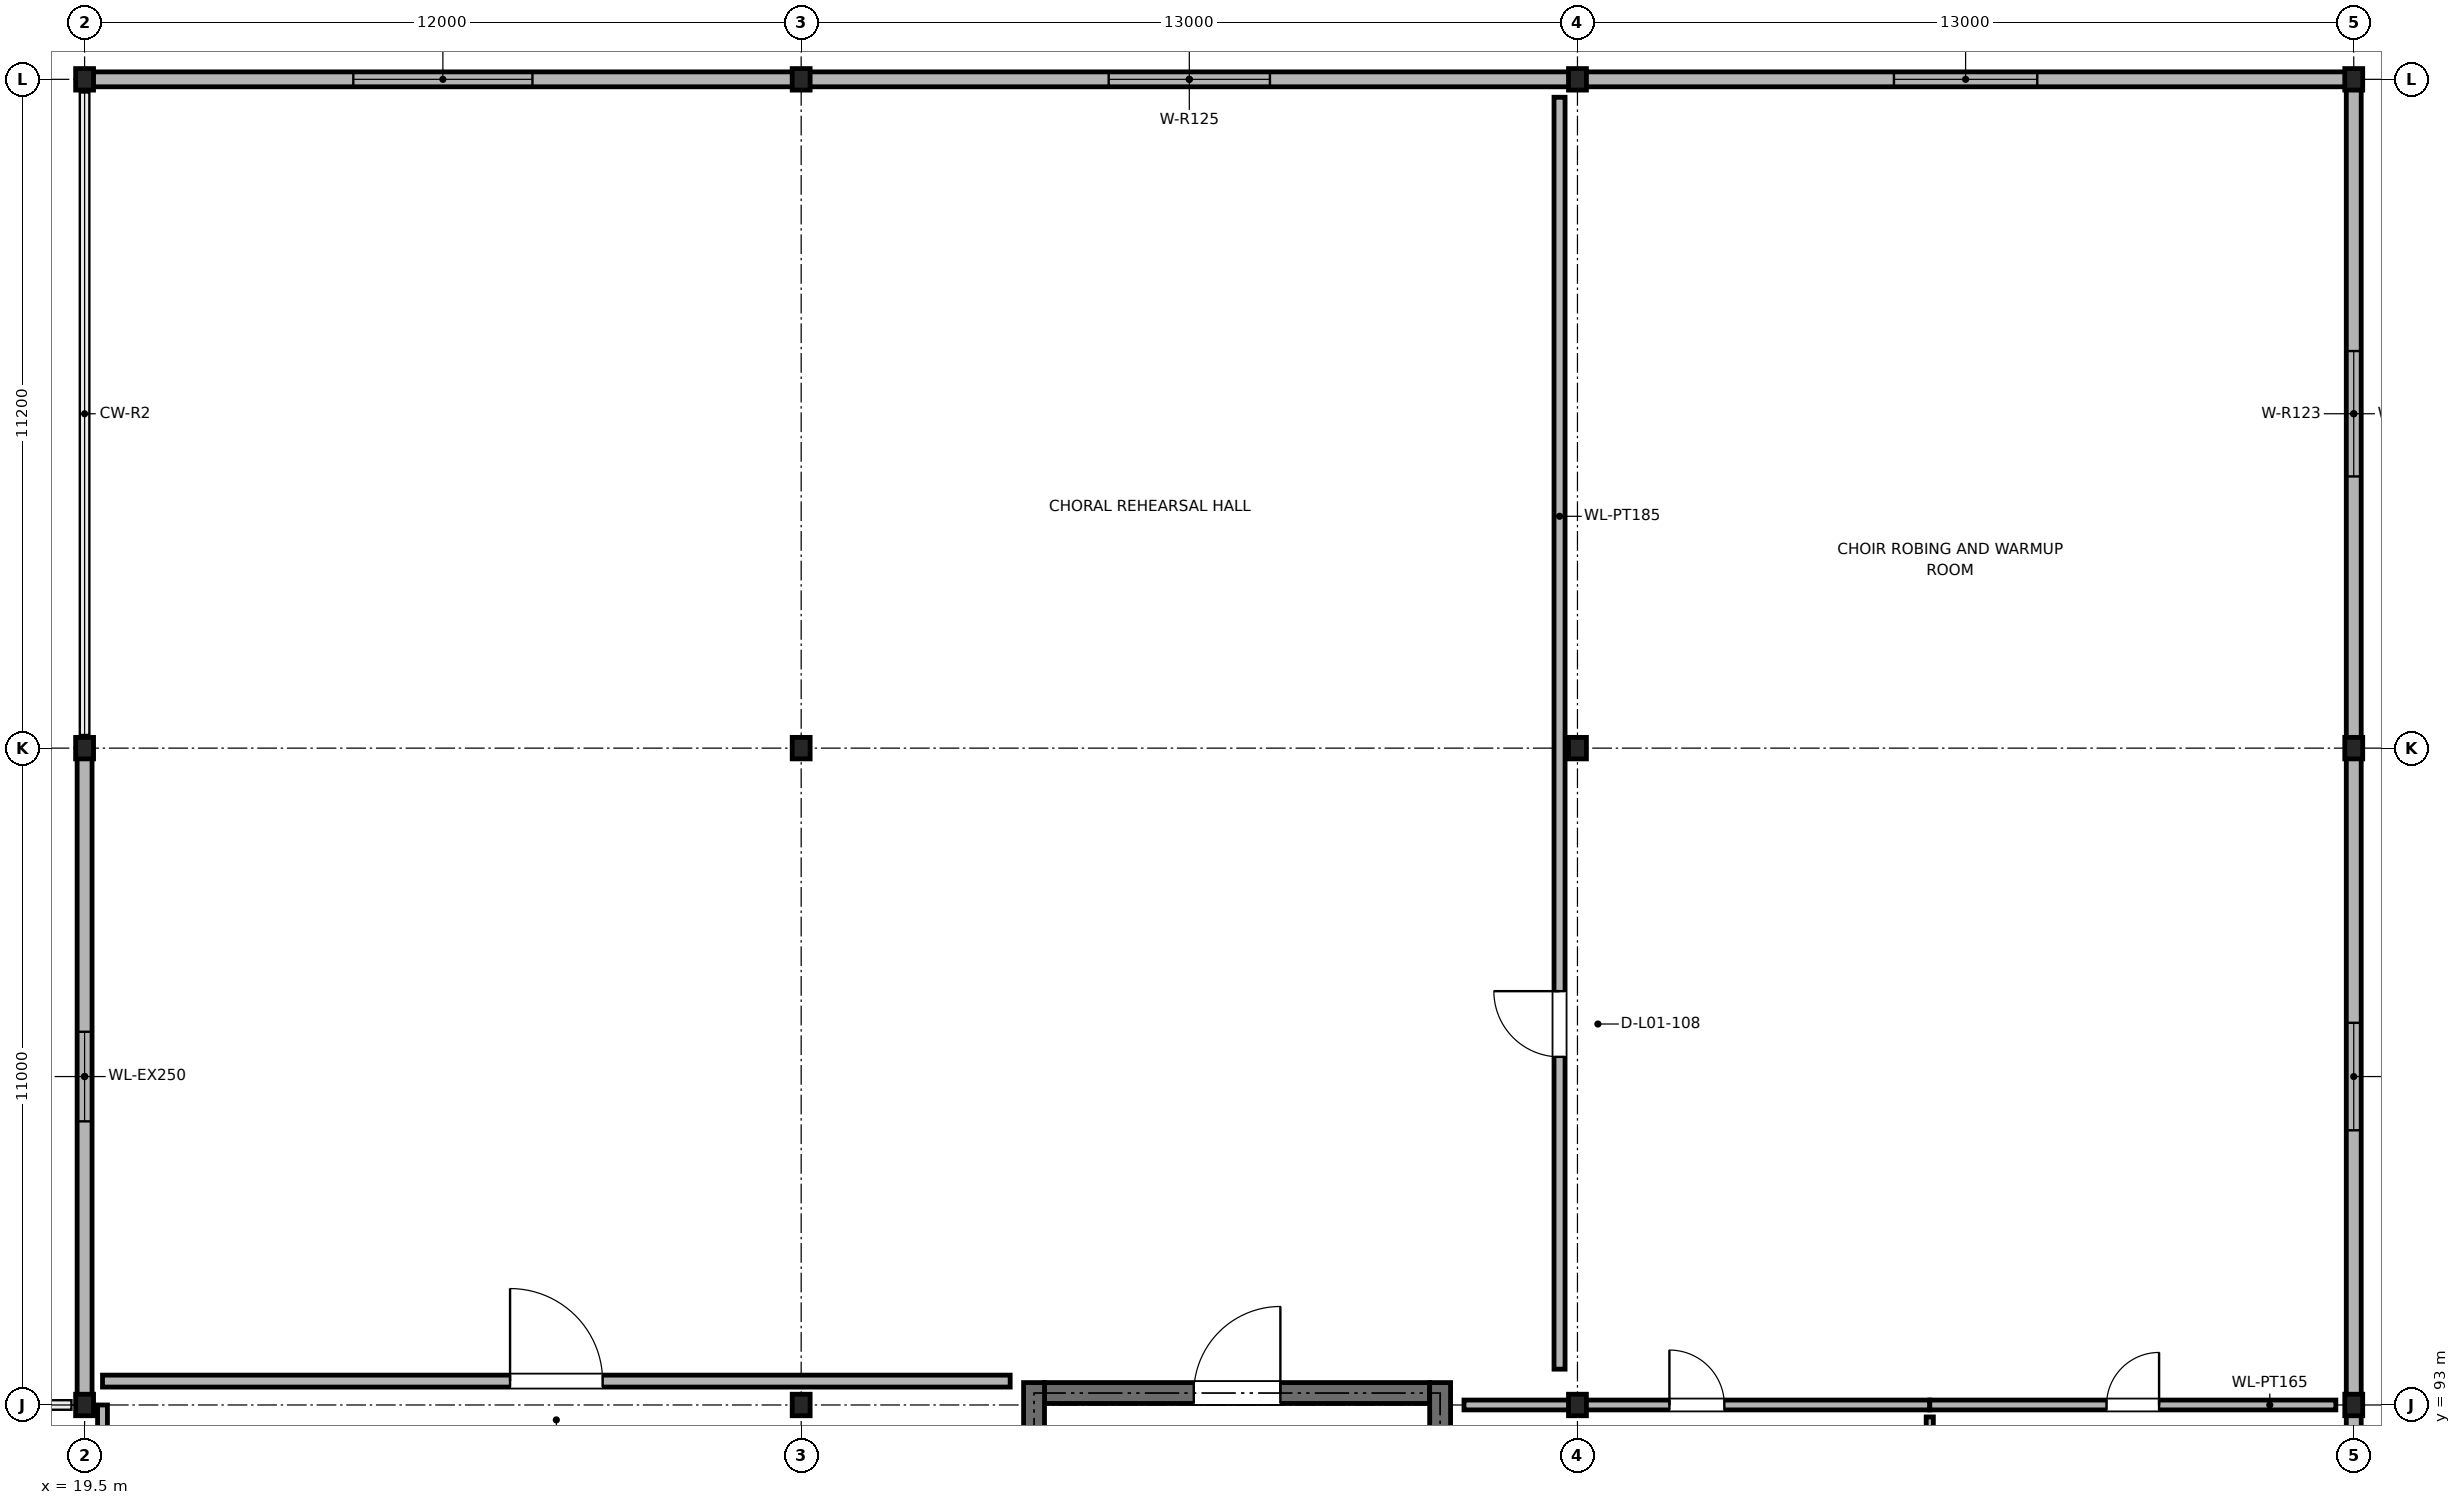
"""IFC4 building model, lengths in metres.
Left out: names, types, materials, properties, quantities, classifications, styles, units other than length and angle.
Written with IfcOpenShell. Run it as: python <this file> out.ifc"""

import sys

from ifc_helpers import new_model, si_unit, direction, frame, frame_2d, origin, origin_2d, place, context, subcontext, project, spatial, rectangle, i_section, extrude, element, fill, save


model = new_model("IFC4")
c1 = context("Model", 3, precision=1e-05, world=origin(), true_north=direction((0.0, 1.0)))
c2 = subcontext(c1, "Body", "Model", "MODEL_VIEW")
j1 = project(units=[si_unit("LENGTHUNIT", "METRE"), si_unit("PLANEANGLEUNIT", "RADIAN")], contexts=[c1])
p1 = place(None, origin())
s1 = spatial("IfcSite", under=j1, at=p1, CompositionType="ELEMENT")
p2 = place(p1, origin())
s2 = spatial("IfcBuilding", under=s1, at=p2, CompositionType="ELEMENT")
p3 = place(p2, frame((0.0, 0.0, 4.8)))
s3 = spatial("IfcBuildingStorey", under=s2, at=p3, CompositionType="ELEMENT", Elevation=4.8)
for number, where, z_axis, x_axis in (
    (1, (19.5, 93.0, 0.0), (0.0, 0.0, 1.0), (1.0, 0.0, 0.0)),
    (2, (19.5, 104.0, 0.0), (0.0, 0.0, 1.0), (1.0, 0.0, 0.0)),
    (3, (19.5, 115.2, 0.0), (0.0, 0.0, 1.0), (1.0, 0.0, 0.0)),
    (4, (31.5, 93.0, 0.0), (0.0, 0.0, 1.0), (1.0, 0.0, 0.0)),
    (5, (31.5, 104.0, 0.0), (0.0, 0.0, 1.0), (1.0, 0.0, 0.0)),
    (6, (31.5, 115.2, 0.0), (0.0, 0.0, 1.0), (1.0, 0.0, 0.0)),
    (7, (44.5, 93.0, 0.0), (0.0, 0.0, 1.0), (1.0, 0.0, 0.0)),
    (8, (44.5, 104.0, 0.0), (0.0, 0.0, 1.0), (1.0, 0.0, 0.0)),
    (9, (44.5, 115.2, 0.0), (0.0, 0.0, 1.0), (1.0, 0.0, 0.0)),
    (10, (57.5, 93.0, 0.0), (0.0, 0.0, 1.0), (1.0, 0.0, 0.0)),
    (11, (57.5, 104.0, 0.0), (0.0, 0.0, 1.0), (1.0, 0.0, 0.0)),
    (12, (57.5, 115.2, 0.0), (0.0, 0.0, 1.0), (1.0, 0.0, 0.0)),
):
    element("IfcColumn", number, at=place(p3, frame(where, z_axis=z_axis, x_axis=x_axis)), inside=s3, PredefinedType="COLUMN", context=c2, shape_type="SweptSolid", body=[
        extrude(i_section(OverallWidth=0.3, OverallDepth=0.36, WebThickness=0.012, FlangeThickness=0.022, FilletRadius=0.027, at=origin_2d()), origin(), (0.0, 0.0, 1.0), 4.8),
    ])
p4 = place(p3, frame((57.5, 92.98, 0.0), z_axis=(0.0, 0.0, 1.0), x_axis=(0.0, -1.0, 0.0)))
e13 = element("IfcWall", 13, at=p4, inside=s3, PredefinedType="SOLIDWALL", context=c2, shape_type="SweptSolid", body=[
    extrude(rectangle(XDim=10.96, YDim=0.25, at=frame_2d((5.48, 0.0))), origin(), (0.0, 0.0, 1.0), 4.078),
])
p5 = place(p3, frame((57.5, 103.98, 0.0), z_axis=(0.0, 0.0, 1.0), x_axis=(0.0, -1.0, 0.0)))
e14 = element("IfcWall", 14, at=p5, inside=s3, PredefinedType="SOLIDWALL", context=c2, shape_type="SweptSolid", body=[
    extrude(rectangle(XDim=10.96, YDim=0.25, at=frame_2d((5.48, 0.0))), origin(), (0.0, 0.0, 1.0), 4.078),
])
p6 = place(p5, frame((4.58, 0.0, 0.85)))
e15 = element("IfcOpeningElement", 15, at=p6, cuts=e14, PredefinedType="OPENING", context=c2, shape_type="SweptSolid", body=[
    extrude(rectangle(XDim=1.8, YDim=1.7, at=frame_2d((0.9, 0.85))), frame((0.0, 0.135, 0.0), z_axis=(0.0, -1.0, 0.0), x_axis=(1.0, 0.0, 0.0)), (0.0, 0.0, 1.0), 0.27),
])
p7 = place(p3, frame((57.5, 115.18, 0.0), z_axis=(0.0, 0.0, 1.0), x_axis=(0.0, -1.0, 0.0)))
e16 = element("IfcWall", 16, at=p7, inside=s3, PredefinedType="SOLIDWALL", context=c2, shape_type="SweptSolid", body=[
    extrude(rectangle(XDim=11.16, YDim=0.25, at=frame_2d((5.58, 0.0))), origin(), (0.0, 0.0, 1.0), 4.078),
])
p8 = place(p7, frame((4.53, 0.0, 0.85)))
e17 = element("IfcOpeningElement", 17, at=p8, cuts=e16, PredefinedType="OPENING", context=c2, shape_type="SweptSolid", body=[
    extrude(rectangle(XDim=2.1, YDim=1.7, at=frame_2d((1.05, 0.85))), frame((0.0, 0.135, 0.0), z_axis=(0.0, -1.0, 0.0), x_axis=(1.0, 0.0, 0.0)), (0.0, 0.0, 1.0), 0.27),
])
p9 = place(p3, frame((44.52, 115.2, 0.0), z_axis=(0.0, 0.0, 1.0), x_axis=(1.0, 0.0, 0.0)))
e18 = element("IfcWall", 18, at=p9, inside=s3, PredefinedType="SOLIDWALL", context=c2, shape_type="SweptSolid", body=[
    extrude(rectangle(XDim=12.96, YDim=0.25, at=frame_2d((6.48, 0.0))), origin(), (0.0, 0.0, 1.0), 4.078),
])
p10 = place(p9, frame((5.28, 0.0, 0.85)))
e19 = element("IfcOpeningElement", 19, at=p10, cuts=e18, PredefinedType="OPENING", context=c2, shape_type="SweptSolid", body=[
    extrude(rectangle(XDim=2.4, YDim=1.7, at=frame_2d((1.2, 0.85))), frame((0.0, 0.135, 0.0), z_axis=(0.0, -1.0, 0.0), x_axis=(1.0, 0.0, 0.0)), (0.0, 0.0, 1.0), 0.27),
])
p11 = place(p3, frame((31.52, 115.2, 0.0), z_axis=(0.0, 0.0, 1.0), x_axis=(1.0, 0.0, 0.0)))
e20 = element("IfcWall", 20, at=p11, inside=s3, PredefinedType="SOLIDWALL", context=c2, shape_type="SweptSolid", body=[
    extrude(rectangle(XDim=12.96, YDim=0.25, at=frame_2d((6.48, 0.0))), origin(), (0.0, 0.0, 1.0), 4.078),
])
p12 = place(p11, frame((5.13, 0.0, 0.85)))
e21 = element("IfcOpeningElement", 21, at=p12, cuts=e20, PredefinedType="OPENING", context=c2, shape_type="SweptSolid", body=[
    extrude(rectangle(XDim=2.7, YDim=1.7, at=frame_2d((1.35, 0.85))), frame((0.0, 0.135, 0.0), z_axis=(0.0, -1.0, 0.0), x_axis=(1.0, 0.0, 0.0)), (0.0, 0.0, 1.0), 0.27),
])
p13 = place(p3, frame((19.52, 115.2, 0.0), z_axis=(0.0, 0.0, 1.0), x_axis=(1.0, 0.0, 0.0)))
e22 = element("IfcWall", 22, at=p13, inside=s3, PredefinedType="SOLIDWALL", context=c2, shape_type="SweptSolid", body=[
    extrude(rectangle(XDim=11.96, YDim=0.25, at=frame_2d((5.98, 0.0))), origin(), (0.0, 0.0, 1.0), 4.078),
])
p14 = place(p13, frame((4.48, 0.0, 0.85)))
e23 = element("IfcOpeningElement", 23, at=p14, cuts=e22, PredefinedType="OPENING", context=c2, shape_type="SweptSolid", body=[
    extrude(rectangle(XDim=3.0, YDim=1.7, at=frame_2d((1.5, 0.85))), frame((0.0, 0.135, 0.0), z_axis=(0.0, -1.0, 0.0), x_axis=(1.0, 0.0, 0.0)), (0.0, 0.0, 1.0), 0.27),
])
p15 = place(p3, frame((19.5, 93.02, 0.0), z_axis=(0.0, 0.0, 1.0), x_axis=(0.0, 1.0, 0.0)))
e24 = element("IfcWall", 24, at=p15, inside=s3, PredefinedType="SOLIDWALL", context=c2, shape_type="SweptSolid", body=[
    extrude(rectangle(XDim=10.96, YDim=0.25, at=frame_2d((5.48, 0.0))), origin(), (0.0, 0.0, 1.0), 4.078),
])
p16 = place(p15, frame((4.73, 0.0, 1.05)))
e25 = element("IfcOpeningElement", 25, at=p16, cuts=e24, PredefinedType="OPENING", context=c2, shape_type="SweptSolid", body=[
    extrude(rectangle(XDim=1.5, YDim=1.35, at=frame_2d((0.75, 0.675))), frame((0.0, 0.135, 0.0), z_axis=(0.0, -1.0, 0.0), x_axis=(1.0, 0.0, 0.0)), (0.0, 0.0, 1.0), 0.27),
])
p17 = place(p3, frame((35.575, 93.2, 0.0), z_axis=(0.0, 0.0, 1.0), x_axis=(1.0, 0.0, 0.0)))
e26 = element("IfcWall", 26, at=p17, inside=s3, PredefinedType="SHEAR", context=c2, shape_type="SweptSolid", body=[
    extrude(rectangle(XDim=6.45, YDim=0.35, at=frame_2d((3.225, 0.0))), origin(), (0.0, 0.0, 1.0), 4.54),
])
p18 = place(p17, frame((2.5, 0.0, 0.0)))
e27 = element("IfcOpeningElement", 27, at=p18, cuts=e26, PredefinedType="OPENING", context=c2, shape_type="SweptSolid", body=[
    extrude(rectangle(XDim=1.45, YDim=2.2, at=frame_2d((0.725, 1.1))), frame((0.0, 0.185, 0.0), z_axis=(0.0, -1.0, 0.0), x_axis=(1.0, 0.0, 0.0)), (0.0, 0.0, 1.0), 0.37),
])
for number, where, z_axis, x_axis in (
    (28, (35.4, 81.775, 0.0), (0.0, 0.0, 1.0), (0.0, 1.0, 0.0)),
    (29, (42.2, 81.775, 0.0), (0.0, 0.0, 1.0), (0.0, 1.0, 0.0)),
):
    element("IfcWall", number, at=place(p3, frame(where, z_axis=z_axis, x_axis=x_axis)), inside=s3, PredefinedType="SHEAR", context=c2, shape_type="SweptSolid", body=[
        extrude(rectangle(XDim=11.6, YDim=0.35, at=frame_2d((5.8, 0.0))), origin(), (0.0, 0.0, 1.0), 4.54),
    ])
p19 = place(p3, frame((19.8, 81.6, 0.0), z_axis=(0.0, 0.0, 1.0), x_axis=(0.0, 1.0, 0.0)))
e30 = element("IfcWall", 30, at=p19, inside=s3, PredefinedType="PARTITIONING", context=c2, shape_type="SweptSolid", body=[
    extrude(rectangle(XDim=11.4, YDim=0.165, at=frame_2d((5.7, 0.0))), origin(), (0.0, 0.0, 1.0), 4.08),
])
p20 = place(p19, frame((8.257, 0.0, 0.0)))
e31 = element("IfcOpeningElement", 31, at=p20, cuts=e30, PredefinedType="OPENING", context=c2, shape_type="SweptSolid", body=[
    extrude(rectangle(XDim=1.05, YDim=2.15, at=frame_2d((0.525, 1.075))), frame((0.0, 0.093, 0.0), z_axis=(0.0, -1.0, 0.0), x_axis=(1.0, 0.0, 0.0)), (0.0, 0.0, 1.0), 0.185),
])
p21 = place(p3, frame((42.6, 93.0, 0.0), z_axis=(0.0, 0.0, 1.0), x_axis=(1.0, 0.0, 0.0)))
e32 = element("IfcWall", 32, at=p21, inside=s3, PredefinedType="PARTITIONING", context=c2, shape_type="SweptSolid", body=[
    extrude(rectangle(XDim=7.8, YDim=0.165, at=frame_2d((3.9, 0.0))), origin(), (0.0, 0.0, 1.0), 4.08),
])
p22 = place(p21, frame((3.44, 0.0, 0.0)))
e33 = element("IfcOpeningElement", 33, at=p22, cuts=e32, PredefinedType="OPENING", context=c2, shape_type="SweptSolid", body=[
    extrude(rectangle(XDim=0.92, YDim=2.1, at=frame_2d((0.46, 1.05))), frame((0.0, 0.093, 0.0), z_axis=(0.0, -1.0, 0.0), x_axis=(1.0, 0.0, 0.0)), (0.0, 0.0, 1.0), 0.185),
])
p23 = place(p3, frame((50.4, 93.0, 0.0), z_axis=(0.0, 0.0, 1.0), x_axis=(1.0, 0.0, 0.0)))
e34 = element("IfcWall", 34, at=p23, inside=s3, PredefinedType="PARTITIONING", context=c2, shape_type="SweptSolid", body=[
    extrude(rectangle(XDim=6.8, YDim=0.165, at=frame_2d((3.4, 0.0))), origin(), (0.0, 0.0, 1.0), 4.08),
])
p24 = place(p23, frame((2.96, 0.0, 0.0)))
e35 = element("IfcOpeningElement", 35, at=p24, cuts=e34, PredefinedType="OPENING", context=c2, shape_type="SweptSolid", body=[
    extrude(rectangle(XDim=0.88, YDim=2.1, at=frame_2d((0.44, 1.05))), frame((0.0, 0.093, 0.0), z_axis=(0.0, -1.0, 0.0), x_axis=(1.0, 0.0, 0.0)), (0.0, 0.0, 1.0), 0.185),
])
p25 = place(p3, frame((50.4, 81.6, 0.0), z_axis=(0.0, 0.0, 1.0), x_axis=(0.0, 1.0, 0.0)))
e36 = element("IfcWall", 36, at=p25, inside=s3, PredefinedType="PARTITIONING", context=c2, shape_type="SweptSolid", body=[
    extrude(rectangle(XDim=11.2, YDim=0.12, at=frame_2d((5.6, 0.0))), origin(), (0.0, 0.0, 1.0), 4.08),
])
p26 = place(p3, frame((44.2, 93.6, 0.0), z_axis=(0.0, 0.0, 1.0), x_axis=(0.0, 1.0, 0.0)))
e37 = element("IfcWall", 37, at=p26, inside=s3, PredefinedType="PARTITIONING", context=c2, shape_type="SweptSolid", body=[
    extrude(rectangle(XDim=21.3, YDim=0.185, at=frame_2d((10.65, 0.0))), origin(), (0.0, 0.0, 1.0), 4.08),
])
p27 = place(p26, frame((5.23, 0.0, 0.0)))
e38 = element("IfcOpeningElement", 38, at=p27, cuts=e37, PredefinedType="OPENING", context=c2, shape_type="SweptSolid", body=[
    extrude(rectangle(XDim=1.1, YDim=2.15, at=frame_2d((0.55, 1.075))), frame((0.0, 0.103, 0.0), z_axis=(0.0, -1.0, 0.0), x_axis=(1.0, 0.0, 0.0)), (0.0, 0.0, 1.0), 0.205),
])
p28 = place(p3, frame((19.8, 93.4, 0.0), z_axis=(0.0, 0.0, 1.0), x_axis=(1.0, 0.0, 0.0)))
e39 = element("IfcWall", 39, at=p28, inside=s3, PredefinedType="PARTITIONING", context=c2, shape_type="SweptSolid", body=[
    extrude(rectangle(XDim=15.2, YDim=0.2, at=frame_2d((7.6, 0.0))), origin(), (0.0, 0.0, 1.0), 4.08),
])
p29 = place(p28, frame((6.825, 0.0, 0.0)))
e40 = element("IfcOpeningElement", 40, at=p29, cuts=e39, PredefinedType="OPENING", context=c2, shape_type="SweptSolid", body=[
    extrude(rectangle(XDim=1.55, YDim=2.18, at=frame_2d((0.775, 1.09))), frame((0.0, 0.11, 0.0), z_axis=(0.0, -1.0, 0.0), x_axis=(1.0, 0.0, 0.0)), (0.0, 0.0, 1.0), 0.22),
])
p30 = place(p6, origin())
e41 = element("IfcWindow", 41, at=p30, inside=s3, PartitioningType="SINGLE_PANEL", PredefinedType="WINDOW", context=c2, shape_type="SweptSolid", body=[
    extrude(rectangle(XDim=1.8, YDim=1.7, at=frame_2d((0.9, 0.85))), frame((0.0, 0.03, 0.0), z_axis=(0.0, -1.0, 0.0), x_axis=(1.0, 0.0, 0.0)), (0.0, 0.0, 1.0), 0.06),
])
fill(e15, e41)
p31 = place(p8, origin())
e42 = element("IfcWindow", 42, at=p31, inside=s3, PartitioningType="SINGLE_PANEL", PredefinedType="WINDOW", context=c2, shape_type="SweptSolid", body=[
    extrude(rectangle(XDim=2.1, YDim=1.7, at=frame_2d((1.05, 0.85))), frame((0.0, 0.03, 0.0), z_axis=(0.0, -1.0, 0.0), x_axis=(1.0, 0.0, 0.0)), (0.0, 0.0, 1.0), 0.06),
])
fill(e17, e42)
p32 = place(p10, origin())
e43 = element("IfcWindow", 43, at=p32, inside=s3, PartitioningType="SINGLE_PANEL", PredefinedType="WINDOW", context=c2, shape_type="SweptSolid", body=[
    extrude(rectangle(XDim=2.4, YDim=1.7, at=frame_2d((1.2, 0.85))), frame((0.0, 0.03, 0.0), z_axis=(0.0, -1.0, 0.0), x_axis=(1.0, 0.0, 0.0)), (0.0, 0.0, 1.0), 0.06),
])
fill(e19, e43)
p33 = place(p12, origin())
e44 = element("IfcWindow", 44, at=p33, inside=s3, PartitioningType="SINGLE_PANEL", PredefinedType="WINDOW", context=c2, shape_type="SweptSolid", body=[
    extrude(rectangle(XDim=2.7, YDim=1.7, at=frame_2d((1.35, 0.85))), frame((0.0, 0.03, 0.0), z_axis=(0.0, -1.0, 0.0), x_axis=(1.0, 0.0, 0.0)), (0.0, 0.0, 1.0), 0.06),
])
fill(e21, e44)
p34 = place(p14, origin())
e45 = element("IfcWindow", 45, at=p34, inside=s3, PartitioningType="SINGLE_PANEL", PredefinedType="WINDOW", context=c2, shape_type="SweptSolid", body=[
    extrude(rectangle(XDim=3.0, YDim=1.7, at=frame_2d((1.5, 0.85))), frame((0.0, 0.03, 0.0), z_axis=(0.0, -1.0, 0.0), x_axis=(1.0, 0.0, 0.0)), (0.0, 0.0, 1.0), 0.06),
])
fill(e23, e45)
p35 = place(p16, origin())
e46 = element("IfcWindow", 46, at=p35, inside=s3, PartitioningType="SINGLE_PANEL", PredefinedType="WINDOW", context=c2, shape_type="SweptSolid", body=[
    extrude(rectangle(XDim=1.5, YDim=1.35, at=frame_2d((0.75, 0.675))), frame((0.0, 0.03, 0.0), z_axis=(0.0, -1.0, 0.0), x_axis=(1.0, 0.0, 0.0)), (0.0, 0.0, 1.0), 0.06),
])
fill(e25, e46)
p36 = place(p18, origin())
e47 = element("IfcDoor", 47, at=p36, inside=s3, OperationType="SINGLE_SWING_RIGHT", PredefinedType="DOOR", context=c2, shape_type="SweptSolid", body=[
    extrude(rectangle(XDim=1.45, YDim=2.2, at=frame_2d((0.725, 1.1))), frame((0.0, 0.025, 0.0), z_axis=(0.0, -1.0, 0.0), x_axis=(1.0, 0.0, 0.0)), (0.0, 0.0, 1.0), 0.05),
])
fill(e27, e47)
p37 = place(p22, origin())
e48 = element("IfcDoor", 48, at=p37, inside=s3, OperationType="SINGLE_SWING_LEFT", PredefinedType="DOOR", context=c2, shape_type="SweptSolid", body=[
    extrude(rectangle(XDim=0.92, YDim=2.1, at=frame_2d((0.46, 1.05))), frame((0.0, 0.025, 0.0), z_axis=(0.0, -1.0, 0.0), x_axis=(1.0, 0.0, 0.0)), (0.0, 0.0, 1.0), 0.05),
])
fill(e33, e48)
p38 = place(p24, origin())
e49 = element("IfcDoor", 49, at=p38, inside=s3, OperationType="SINGLE_SWING_RIGHT", PredefinedType="DOOR", context=c2, shape_type="SweptSolid", body=[
    extrude(rectangle(XDim=0.88, YDim=2.1, at=frame_2d((0.44, 1.05))), frame((0.0, 0.025, 0.0), z_axis=(0.0, -1.0, 0.0), x_axis=(1.0, 0.0, 0.0)), (0.0, 0.0, 1.0), 0.05),
])
fill(e35, e49)
p39 = place(p27, origin())
e50 = element("IfcDoor", 50, at=p39, inside=s3, OperationType="SINGLE_SWING_RIGHT", PredefinedType="DOOR", context=c2, shape_type="SweptSolid", body=[
    extrude(rectangle(XDim=1.1, YDim=2.15, at=frame_2d((0.55, 1.075))), frame((0.0, 0.025, 0.0), z_axis=(0.0, -1.0, 0.0), x_axis=(1.0, 0.0, 0.0)), (0.0, 0.0, 1.0), 0.05),
])
fill(e38, e50)
p40 = place(p29, origin())
e51 = element("IfcDoor", 51, at=p40, inside=s3, OperationType="SINGLE_SWING_LEFT", PredefinedType="DOOR", context=c2, shape_type="SweptSolid", body=[
    extrude(rectangle(XDim=1.55, YDim=2.18, at=frame_2d((0.775, 1.09))), frame((0.0, 0.025, 0.0), z_axis=(0.0, -1.0, 0.0), x_axis=(1.0, 0.0, 0.0)), (0.0, 0.0, 1.0), 0.05),
])
fill(e40, e51)
save(model, sys.argv[1])
